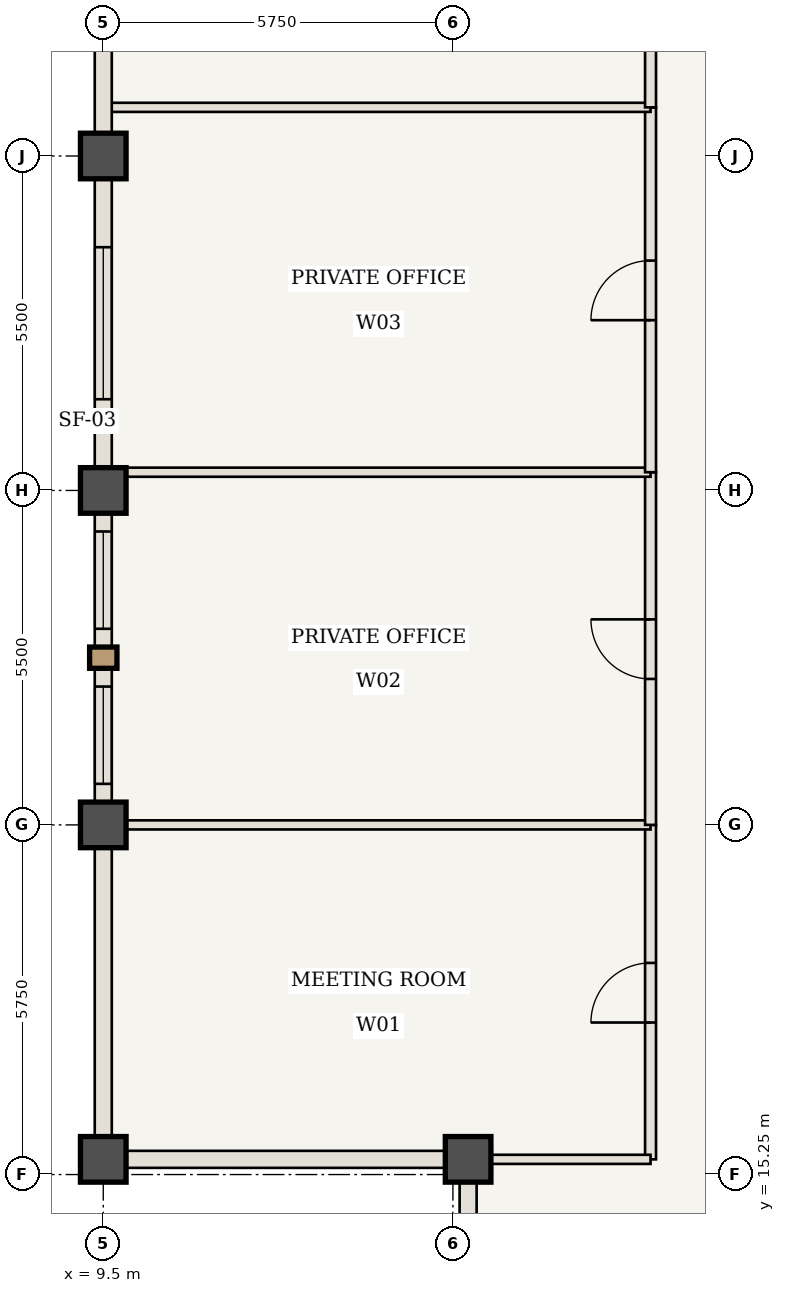
"""IFC4 building model, lengths in metres.
Left out: names, types, materials, properties, quantities, classifications, styles, units other than length and angle.
Written with IfcOpenShell. Run it as: python <this file> out.ifc"""

import sys

from ifc_helpers import new_model, si_unit, direction, frame, frame_2d, origin, origin_2d, place, context, subcontext, project, spatial, rectangle, extrude, element, fill, save


model = new_model("IFC4")
c1 = context("Model", 3, precision=1e-05, world=origin(), true_north=direction((0.0, 1.0)))
c2 = subcontext(c1, "Body", "Model", "MODEL_VIEW")
j1 = project(units=[si_unit("LENGTHUNIT", "METRE"), si_unit("PLANEANGLEUNIT", "RADIAN")], contexts=[c1])
p1 = place(None, origin())
s1 = spatial("IfcSite", under=j1, at=p1, CompositionType="ELEMENT")
p2 = place(p1, origin())
s2 = spatial("IfcBuilding", under=s1, at=p2, CompositionType="ELEMENT")
p3 = place(p2, frame((0.0, 0.0, 285.25)))
s3 = spatial("IfcBuildingStorey", under=s2, at=p3, CompositionType="ELEMENT", Elevation=285.25)
for number, where, z_axis, x_axis in (
    (1, (15.5, 15.5, 0.0), (0.0, 0.0, 1.0), (1.0, 0.0, 0.0)),
    (2, (9.5, 15.5, 0.0), (0.0, 0.0, 1.0), (1.0, 0.0, 0.0)),
    (3, (9.5, 21.0, 0.0), (0.0, 0.0, 1.0), (1.0, 0.0, 0.0)),
    (4, (9.5, 26.5, 0.0), (0.0, 0.0, 1.0), (1.0, 0.0, 0.0)),
    (5, (9.5, 32.0, 0.0), (0.0, 0.0, 1.0), (1.0, 0.0, 0.0)),
):
    element("IfcColumn", number, at=place(p3, frame(where, z_axis=z_axis, x_axis=x_axis)), inside=s3, PredefinedType="COLUMN", context=c2, shape_type="SweptSolid", body=[
        extrude(rectangle(XDim=0.75, YDim=0.75, at=origin_2d()), origin(), (0.0, 0.0, 1.0), 3.85),
    ])
p4 = place(p3, frame((18.5, 15.5, 0.0), z_axis=(0.0, 0.0, 1.0), x_axis=(0.0, 1.0, 0.0)))
e6 = element("IfcWall", 6, at=p4, inside=s3, PredefinedType="STANDARD", context=c2, shape_type="SweptSolid", body=[
    extrude(rectangle(XDim=5.5, YDim=0.18, at=frame_2d((2.75, 0.0))), origin(), (0.0, 0.0, 1.0), 3.685),
])
p5 = place(p4, frame((2.25, 0.0, 0.0)))
e7 = element("IfcOpeningElement", 7, at=p5, cuts=e6, PredefinedType="OPENING", context=c2, shape_type="SweptSolid", body=[
    extrude(rectangle(XDim=0.98, YDim=2.2, at=frame_2d((0.49, 1.1))), frame((0.0, 0.1, 0.0), z_axis=(0.0, -1.0, 0.0), x_axis=(1.0, 0.0, 0.0)), (0.0, 0.0, 1.0), 0.2),
])
p6 = place(p3, frame((9.56, 21.0, 0.0), z_axis=(0.0, 0.0, 1.0), x_axis=(1.0, 0.0, 0.0)))
e8 = element("IfcWall", 8, at=p6, inside=s3, PredefinedType="STANDARD", context=c2, shape_type="SweptSolid", body=[
    extrude(rectangle(XDim=8.94, YDim=0.15, at=frame_2d((4.47, 0.0))), origin(), (0.0, 0.0, 1.0), 3.685),
])
p7 = place(p3, frame((18.5, 21.0, 0.0), z_axis=(0.0, 0.0, 1.0), x_axis=(0.0, 1.0, 0.0)))
e9 = element("IfcWall", 9, at=p7, inside=s3, PredefinedType="STANDARD", context=c2, shape_type="SweptSolid", body=[
    extrude(rectangle(XDim=5.8, YDim=0.18, at=frame_2d((2.9, 0.0))), origin(), (0.0, 0.0, 1.0), 3.685),
])
p8 = place(p7, frame((2.4, 0.0, 0.0)))
e10 = element("IfcOpeningElement", 10, at=p8, cuts=e9, PredefinedType="OPENING", context=c2, shape_type="SweptSolid", body=[
    extrude(rectangle(XDim=0.98, YDim=2.2, at=frame_2d((0.49, 1.1))), frame((0.0, 0.1, 0.0), z_axis=(0.0, -1.0, 0.0), x_axis=(1.0, 0.0, 0.0)), (0.0, 0.0, 1.0), 0.2),
])
p9 = place(p3, frame((9.56, 26.8, 0.0), z_axis=(0.0, 0.0, 1.0), x_axis=(1.0, 0.0, 0.0)))
e11 = element("IfcWall", 11, at=p9, inside=s3, PredefinedType="STANDARD", context=c2, shape_type="SweptSolid", body=[
    extrude(rectangle(XDim=8.94, YDim=0.15, at=frame_2d((4.47, 0.0))), origin(), (0.0, 0.0, 1.0), 3.685),
])
p10 = place(p3, frame((18.5, 26.8, 0.0), z_axis=(0.0, 0.0, 1.0), x_axis=(0.0, 1.0, 0.0)))
e12 = element("IfcWall", 12, at=p10, inside=s3, PredefinedType="STANDARD", context=c2, shape_type="SweptSolid", body=[
    extrude(rectangle(XDim=6.0, YDim=0.18, at=frame_2d((3.0, 0.0))), origin(), (0.0, 0.0, 1.0), 3.685),
])
p11 = place(p10, frame((2.5, 0.0, 0.0)))
e13 = element("IfcOpeningElement", 13, at=p11, cuts=e12, PredefinedType="OPENING", context=c2, shape_type="SweptSolid", body=[
    extrude(rectangle(XDim=0.98, YDim=2.2, at=frame_2d((0.49, 1.1))), frame((0.0, 0.1, 0.0), z_axis=(0.0, -1.0, 0.0), x_axis=(1.0, 0.0, 0.0)), (0.0, 0.0, 1.0), 0.2),
])
p12 = place(p3, frame((9.56, 32.8, 0.0), z_axis=(0.0, 0.0, 1.0), x_axis=(1.0, 0.0, 0.0)))
e14 = element("IfcWall", 14, at=p12, inside=s3, PredefinedType="STANDARD", context=c2, shape_type="SweptSolid", body=[
    extrude(rectangle(XDim=8.94, YDim=0.15, at=frame_2d((4.47, 0.0))), origin(), (0.0, 0.0, 1.0), 3.685),
])
p13 = place(p3, frame((18.5, 32.8, 0.0), z_axis=(0.0, 0.0, 1.0), x_axis=(0.0, 1.0, 0.0)))
e15 = element("IfcWall", 15, at=p13, inside=s3, PredefinedType="STANDARD", context=c2, shape_type="SweptSolid", body=[
    extrude(rectangle(XDim=6.4, YDim=0.18, at=frame_2d((3.2, 0.0))), origin(), (0.0, 0.0, 1.0), 3.685),
])
p14 = place(p13, frame((2.7, 0.0, 0.0)))
e16 = element("IfcOpeningElement", 16, at=p14, cuts=e15, PredefinedType="OPENING", context=c2, shape_type="SweptSolid", body=[
    extrude(rectangle(XDim=0.98, YDim=2.2, at=frame_2d((0.49, 1.1))), frame((0.0, 0.1, 0.0), z_axis=(0.0, -1.0, 0.0), x_axis=(1.0, 0.0, 0.0)), (0.0, 0.0, 1.0), 0.2),
])
p15 = place(p3, frame((15.5, 15.5, 0.0), z_axis=(0.0, 0.0, 1.0), x_axis=(1.0, 0.0, 0.0)))
e17 = element("IfcWall", 17, at=p15, inside=s3, PredefinedType="STANDARD", context=c2, shape_type="SweptSolid", body=[
    extrude(rectangle(XDim=3.0, YDim=0.15, at=frame_2d((1.5, 0.0))), origin(), (0.0, 0.0, 1.0), 3.685),
])
p16 = place(p3, frame((9.5, 15.5, 0.0), z_axis=(0.0, 0.0, 1.0), x_axis=(0.0, 1.0, 0.0)))
e18 = element("IfcWall", 18, at=p16, inside=s3, PredefinedType="USERDEFINED", context=c2, shape_type="SweptSolid", body=[
    extrude(rectangle(XDim=5.5, YDim=0.28, at=frame_2d((2.75, 0.0))), origin(), (0.0, 0.0, 1.0), 2.985),
])
p17 = place(p3, frame((9.5, 21.0, 0.0), z_axis=(0.0, 0.0, 1.0), x_axis=(0.0, 1.0, 0.0)))
e19 = element("IfcWall", 19, at=p17, inside=s3, PredefinedType="USERDEFINED", context=c2, shape_type="SweptSolid", body=[
    extrude(rectangle(XDim=5.5, YDim=0.28, at=frame_2d((2.75, 0.0))), origin(), (0.0, 0.0, 1.0), 2.985),
])
p18 = place(p17, frame((0.675, 0.0, 0.85)))
e20 = element("IfcOpeningElement", 20, at=p18, cuts=e19, PredefinedType="OPENING", context=c2, shape_type="SweptSolid", body=[
    extrude(rectangle(XDim=1.6, YDim=1.935, at=frame_2d((0.8, 0.968))), frame((0.0, 0.15, 0.0), z_axis=(0.0, -1.0, 0.0), x_axis=(1.0, 0.0, 0.0)), (0.0, 0.0, 1.0), 0.3),
])
p19 = place(p17, frame((3.225, 0.0, 0.85)))
e21 = element("IfcOpeningElement", 21, at=p19, cuts=e19, PredefinedType="OPENING", context=c2, shape_type="SweptSolid", body=[
    extrude(rectangle(XDim=1.6, YDim=1.935, at=frame_2d((0.8, 0.968))), frame((0.0, 0.15, 0.0), z_axis=(0.0, -1.0, 0.0), x_axis=(1.0, 0.0, 0.0)), (0.0, 0.0, 1.0), 0.3),
])
p20 = place(p3, frame((9.5, 26.5, 0.0), z_axis=(0.0, 0.0, 1.0), x_axis=(0.0, 1.0, 0.0)))
e22 = element("IfcWall", 22, at=p20, inside=s3, PredefinedType="USERDEFINED", context=c2, shape_type="SweptSolid", body=[
    extrude(rectangle(XDim=5.5, YDim=0.28, at=frame_2d((2.75, 0.0))), origin(), (0.0, 0.0, 1.0), 2.985),
])
p21 = place(p20, frame((1.5, 0.0, 0.85)))
e23 = element("IfcOpeningElement", 23, at=p21, cuts=e22, PredefinedType="OPENING", context=c2, shape_type="SweptSolid", body=[
    extrude(rectangle(XDim=2.5, YDim=1.935, at=frame_2d((1.25, 0.968))), frame((0.0, 0.15, 0.0), z_axis=(0.0, -1.0, 0.0), x_axis=(1.0, 0.0, 0.0)), (0.0, 0.0, 1.0), 0.3),
])
p22 = place(p3, frame((9.5, 32.0, 0.0), z_axis=(0.0, 0.0, 1.0), x_axis=(0.0, 1.0, 0.0)))
e24 = element("IfcWall", 24, at=p22, inside=s3, PredefinedType="USERDEFINED", context=c2, shape_type="SweptSolid", body=[
    extrude(rectangle(XDim=5.5, YDim=0.28, at=frame_2d((2.75, 0.0))), origin(), (0.0, 0.0, 1.0), 2.985),
])
p23 = place(p22, frame((1.738, 0.0, 0.85)))
e25 = element("IfcOpeningElement", 25, at=p23, cuts=e24, PredefinedType="OPENING", context=c2, shape_type="SweptSolid", body=[
    extrude(rectangle(XDim=2.5, YDim=1.935, at=frame_2d((1.25, 0.968))), frame((0.0, 0.15, 0.0), z_axis=(0.0, -1.0, 0.0), x_axis=(1.0, 0.0, 0.0)), (0.0, 0.0, 1.0), 0.3),
])
for number, where, z_axis, x_axis in (
    (26, (15.5, 9.5, 0.0), (0.0, 0.0, 1.0), (0.0, 1.0, 0.0)),
    (27, (15.5, 15.5, 0.0), (0.0, 0.0, 1.0), (-1.0, 0.0, 0.0)),
):
    element("IfcWall", number, at=place(p3, frame(where, z_axis=z_axis, x_axis=x_axis)), inside=s3, PredefinedType="USERDEFINED", context=c2, shape_type="SweptSolid", body=[
        extrude(rectangle(XDim=6.0, YDim=0.28, at=frame_2d((3.0, 0.0))), origin(), (0.0, 0.0, 1.0), 2.985),
    ])
p24 = place(p5, origin())
e28 = element("IfcDoor", 28, at=p24, inside=s3, OperationType="SINGLE_SWING_LEFT", PredefinedType="DOOR", context=c2, shape_type="SweptSolid", body=[
    extrude(rectangle(XDim=0.98, YDim=2.2, at=frame_2d((0.49, 1.1))), frame((0.0, 0.025, 0.0), z_axis=(0.0, -1.0, 0.0), x_axis=(1.0, 0.0, 0.0)), (0.0, 0.0, 1.0), 0.05),
])
fill(e7, e28)
p25 = place(p8, origin())
e29 = element("IfcDoor", 29, at=p25, inside=s3, OperationType="SINGLE_SWING_RIGHT", PredefinedType="DOOR", context=c2, shape_type="SweptSolid", body=[
    extrude(rectangle(XDim=0.98, YDim=2.2, at=frame_2d((0.49, 1.1))), frame((0.0, 0.025, 0.0), z_axis=(0.0, -1.0, 0.0), x_axis=(1.0, 0.0, 0.0)), (0.0, 0.0, 1.0), 0.05),
])
fill(e10, e29)
p26 = place(p11, origin())
e30 = element("IfcDoor", 30, at=p26, inside=s3, OperationType="SINGLE_SWING_LEFT", PredefinedType="DOOR", context=c2, shape_type="SweptSolid", body=[
    extrude(rectangle(XDim=0.98, YDim=2.2, at=frame_2d((0.49, 1.1))), frame((0.0, 0.025, 0.0), z_axis=(0.0, -1.0, 0.0), x_axis=(1.0, 0.0, 0.0)), (0.0, 0.0, 1.0), 0.05),
])
fill(e13, e30)
p27 = place(p18, origin())
e31 = element("IfcWindow", 31, at=p27, inside=s3, PartitioningType="SINGLE_PANEL", PredefinedType="WINDOW", context=c2, shape_type="SweptSolid", body=[
    extrude(rectangle(XDim=1.6, YDim=1.935, at=frame_2d((0.8, 0.968))), frame((0.0, 0.03, 0.0), z_axis=(0.0, -1.0, 0.0), x_axis=(1.0, 0.0, 0.0)), (0.0, 0.0, 1.0), 0.06),
])
fill(e20, e31)
p28 = place(p19, origin())
e32 = element("IfcWindow", 32, at=p28, inside=s3, PartitioningType="SINGLE_PANEL", PredefinedType="WINDOW", context=c2, shape_type="SweptSolid", body=[
    extrude(rectangle(XDim=1.6, YDim=1.935, at=frame_2d((0.8, 0.968))), frame((0.0, 0.03, 0.0), z_axis=(0.0, -1.0, 0.0), x_axis=(1.0, 0.0, 0.0)), (0.0, 0.0, 1.0), 0.06),
])
fill(e21, e32)
p29 = place(p21, origin())
e33 = element("IfcWindow", 33, at=p29, inside=s3, PartitioningType="SINGLE_PANEL", PredefinedType="WINDOW", context=c2, shape_type="SweptSolid", body=[
    extrude(rectangle(XDim=2.5, YDim=1.935, at=frame_2d((1.25, 0.968))), frame((0.0, 0.03, 0.0), z_axis=(0.0, -1.0, 0.0), x_axis=(1.0, 0.0, 0.0)), (0.0, 0.0, 1.0), 0.06),
])
fill(e23, e33)
save(model, sys.argv[1])
